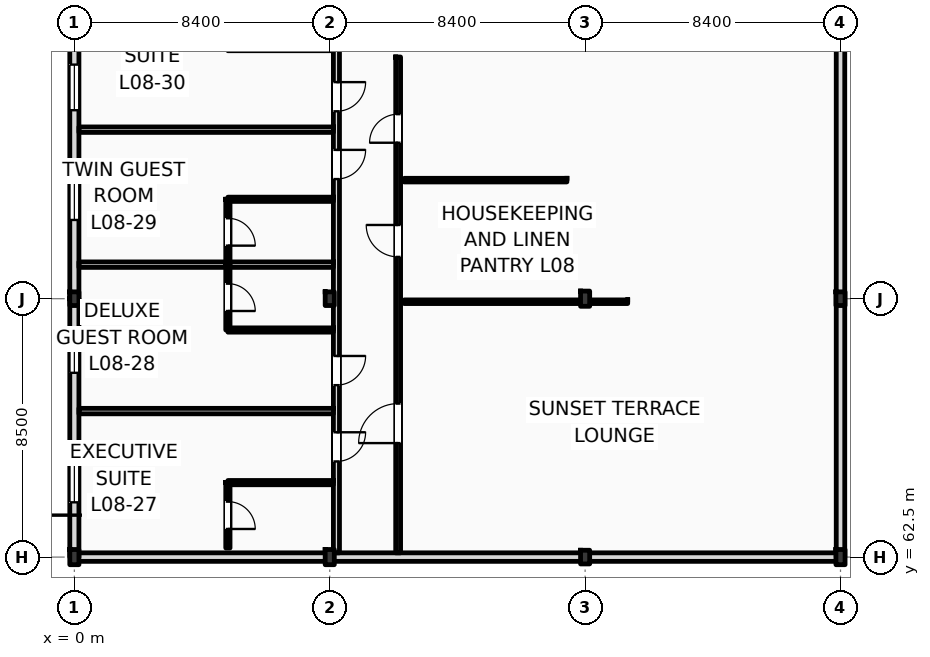
"""IFC4 building model, lengths in metres.
Left out: names, types, materials, properties, quantities, classifications, styles, units other than length and angle.
Written with IfcOpenShell. Run it as: python <this file> out.ifc"""

import sys

from ifc_helpers import new_model, si_unit, direction, frame, frame_2d, origin, origin_2d, place, context, subcontext, project, spatial, rectangle, i_section, extrude, element, fill, save


model = new_model("IFC4")
c1 = context("Model", 3, precision=1e-05, world=origin(), true_north=direction((0.0, 1.0)))
c2 = subcontext(c1, "Body", "Model", "MODEL_VIEW")
j1 = project(units=[si_unit("LENGTHUNIT", "METRE"), si_unit("PLANEANGLEUNIT", "RADIAN")], contexts=[c1])
p1 = place(None, origin())
s1 = spatial("IfcSite", under=j1, at=p1, CompositionType="ELEMENT")
p2 = place(p1, origin())
s2 = spatial("IfcBuilding", under=s1, at=p2, CompositionType="ELEMENT")
p3 = place(p2, frame((0.0, 0.0, 35.4)))
s3 = spatial("IfcBuildingStorey", under=s2, at=p3, CompositionType="ELEMENT", Elevation=35.4)
p4 = place(p3, frame((0.0, 62.5, 0.0), z_axis=(0.0, 0.0, 1.0), x_axis=(1.0, 0.0, 0.0)))
e1 = element("IfcColumn", 1, at=p4, inside=s3, PredefinedType="COLUMN", context=c2, shape_type="SweptSolid", body=[
    extrude(i_section(OverallWidth=0.3, OverallDepth=0.5, WebThickness=0.014, FlangeThickness=0.028, FilletRadius=0.027, at=origin_2d()), origin(), (0.0, 0.0, 1.0), 3.6),
])
p5 = place(p3, frame((0.0, 71.0, 0.0), z_axis=(0.0, 0.0, 1.0), x_axis=(1.0, 0.0, 0.0)))
e2 = element("IfcColumn", 2, at=p5, inside=s3, PredefinedType="COLUMN", context=c2, shape_type="SweptSolid", body=[
    extrude(i_section(OverallWidth=0.3, OverallDepth=0.45, WebThickness=0.014, FlangeThickness=0.026, FilletRadius=0.027, at=origin_2d()), origin(), (0.0, 0.0, 1.0), 3.6),
])
p6 = place(p3, frame((8.4, 62.5, 0.0), z_axis=(0.0, 0.0, 1.0), x_axis=(1.0, 0.0, 0.0)))
e3 = element("IfcColumn", 3, at=p6, inside=s3, PredefinedType="COLUMN", context=c2, shape_type="SweptSolid", body=[
    extrude(i_section(OverallWidth=0.3, OverallDepth=0.5, WebThickness=0.014, FlangeThickness=0.028, FilletRadius=0.027, at=origin_2d()), origin(), (0.0, 0.0, 1.0), 3.6),
])
for number, where, z_axis, x_axis in (
    (4, (8.4, 71.0, 0.0), (0.0, 0.0, 1.0), (1.0, 0.0, 0.0)),
    (5, (16.8, 62.5, 0.0), (0.0, 0.0, 1.0), (1.0, 0.0, 0.0)),
):
    element("IfcColumn", number, at=place(p3, frame(where, z_axis=z_axis, x_axis=x_axis)), inside=s3, PredefinedType="COLUMN", context=c2, shape_type="SweptSolid", body=[
        extrude(i_section(OverallWidth=0.3, OverallDepth=0.45, WebThickness=0.014, FlangeThickness=0.026, FilletRadius=0.027, at=origin_2d()), origin(), (0.0, 0.0, 1.0), 3.6),
    ])
for number, where, z_axis, x_axis in (
    (6, (16.8, 71.0, 0.0), (0.0, 0.0, 1.0), (1.0, 0.0, 0.0)),
    (7, (25.2, 62.5, 0.0), (0.0, 0.0, 1.0), (1.0, 0.0, 0.0)),
):
    element("IfcColumn", number, at=place(p3, frame(where, z_axis=z_axis, x_axis=x_axis)), inside=s3, PredefinedType="COLUMN", context=c2, shape_type="SweptSolid", body=[
        extrude(i_section(OverallWidth=0.3, OverallDepth=0.5, WebThickness=0.014, FlangeThickness=0.028, FilletRadius=0.027, at=origin_2d()), origin(), (0.0, 0.0, 1.0), 3.6),
    ])
p7 = place(p3, frame((25.2, 71.0, 0.0), z_axis=(0.0, 0.0, 1.0), x_axis=(1.0, 0.0, 0.0)))
e8 = element("IfcColumn", 8, at=p7, inside=s3, PredefinedType="COLUMN", context=c2, shape_type="SweptSolid", body=[
    extrude(i_section(OverallWidth=0.3, OverallDepth=0.45, WebThickness=0.014, FlangeThickness=0.026, FilletRadius=0.027, at=origin_2d()), origin(), (0.0, 0.0, 1.0), 3.6),
])
p8 = place(p3, frame((0.0, 62.5, 0.0), z_axis=(0.0, 0.0, 1.0), x_axis=(0.0, 1.0, 0.0)))
e9 = element("IfcWall", 9, at=p8, inside=s3, PredefinedType="STANDARD", context=c2, shape_type="SweptSolid", body=[
    extrude(rectangle(XDim=8.5, YDim=0.3, at=frame_2d((4.25, 0.0))), origin(), (0.0, 0.0, 1.0), 3.01),
])
p9 = place(p8, frame((1.802, 0.0, 0.9)))
e10 = element("IfcOpeningElement", 10, at=p9, cuts=e9, PredefinedType="OPENING", context=c2, shape_type="SweptSolid", body=[
    extrude(rectangle(XDim=1.5, YDim=1.93, at=frame_2d((0.75, 0.965))), frame((0.0, 0.16, 0.0), z_axis=(0.0, -1.0, 0.0), x_axis=(1.0, 0.0, 0.0)), (0.0, 0.0, 1.0), 0.32),
])
p10 = place(p8, frame((6.062, 0.0, 0.9)))
e11 = element("IfcOpeningElement", 11, at=p10, cuts=e9, PredefinedType="OPENING", context=c2, shape_type="SweptSolid", body=[
    extrude(rectangle(XDim=1.5, YDim=1.93, at=frame_2d((0.75, 0.965))), frame((0.0, 0.16, 0.0), z_axis=(0.0, -1.0, 0.0), x_axis=(1.0, 0.0, 0.0)), (0.0, 0.0, 1.0), 0.32),
])
p11 = place(p3, frame((0.0, 71.0, 0.0), z_axis=(0.0, 0.0, 1.0), x_axis=(0.0, 1.0, 0.0)))
e12 = element("IfcWall", 12, at=p11, inside=s3, PredefinedType="STANDARD", context=c2, shape_type="SweptSolid", body=[
    extrude(rectangle(XDim=8.5, YDim=0.3, at=frame_2d((4.25, 0.0))), origin(), (0.0, 0.0, 1.0), 3.01),
])
p12 = place(p11, frame((2.59, 0.0, 0.9)))
e13 = element("IfcOpeningElement", 13, at=p12, cuts=e12, PredefinedType="OPENING", context=c2, shape_type="SweptSolid", body=[
    extrude(rectangle(XDim=1.5, YDim=1.93, at=frame_2d((0.75, 0.965))), frame((0.0, 0.16, 0.0), z_axis=(0.0, -1.0, 0.0), x_axis=(1.0, 0.0, 0.0)), (0.0, 0.0, 1.0), 0.32),
])
p13 = place(p11, frame((6.2, 0.0, 0.9)))
e14 = element("IfcOpeningElement", 14, at=p13, cuts=e12, PredefinedType="OPENING", context=c2, shape_type="SweptSolid", body=[
    extrude(rectangle(XDim=1.5, YDim=1.93, at=frame_2d((0.75, 0.965))), frame((0.0, 0.16, 0.0), z_axis=(0.0, -1.0, 0.0), x_axis=(1.0, 0.0, 0.0)), (0.0, 0.0, 1.0), 0.32),
])
p14 = place(p3, frame((0.0, 62.5, 0.0), z_axis=(0.0, 0.0, 1.0), x_axis=(1.0, 0.0, 0.0)))
e15 = element("IfcWall", 15, at=p14, inside=s3, PredefinedType="STANDARD", context=c2, shape_type="SweptSolid", body=[
    extrude(rectangle(XDim=25.2, YDim=0.28, at=frame_2d((12.6, 0.0))), origin(), (0.0, 0.0, 1.0), 2.82),
])
p15 = place(p3, frame((25.2, 62.5, 0.0), z_axis=(0.0, 0.0, 1.0), x_axis=(0.0, 1.0, 0.0)))
e16 = element("IfcWall", 16, at=p15, inside=s3, PredefinedType="STANDARD", context=c2, shape_type="SweptSolid", body=[
    extrude(rectangle(XDim=17.0, YDim=0.28, at=frame_2d((8.5, 0.0))), origin(), (0.0, 0.0, 1.0), 3.01),
])
p16 = place(p3, frame((8.62, 62.64, 0.0), z_axis=(0.0, 0.0, 1.0), x_axis=(0.0, 1.0, 0.0)))
e17 = element("IfcWall", 17, at=p16, inside=s3, PredefinedType="PARTITIONING", context=c2, shape_type="SweptSolid", body=[
    extrude(rectangle(XDim=32.66, YDim=0.2, at=frame_2d((16.33, 0.0))), origin(), (0.0, 0.0, 1.0), 3.01),
])
p17 = place(p16, frame((3.006, 0.0, 0.0)))
e18 = element("IfcOpeningElement", 18, at=p17, cuts=e17, PredefinedType="OPENING", context=c2, shape_type="SweptSolid", body=[
    extrude(rectangle(XDim=0.96, YDim=2.2, at=frame_2d((0.48, 1.1))), frame((0.0, 0.11, 0.0), z_axis=(0.0, -1.0, 0.0), x_axis=(1.0, 0.0, 0.0)), (0.0, 0.0, 1.0), 0.22),
])
p18 = place(p16, frame((5.516, 0.0, 0.0)))
e19 = element("IfcOpeningElement", 19, at=p18, cuts=e17, PredefinedType="OPENING", context=c2, shape_type="SweptSolid", body=[
    extrude(rectangle(XDim=0.96, YDim=2.2, at=frame_2d((0.48, 1.1))), frame((0.0, 0.11, 0.0), z_axis=(0.0, -1.0, 0.0), x_axis=(1.0, 0.0, 0.0)), (0.0, 0.0, 1.0), 0.22),
])
p19 = place(p16, frame((12.295, 0.0, 0.0)))
e20 = element("IfcOpeningElement", 20, at=p19, cuts=e17, PredefinedType="OPENING", context=c2, shape_type="SweptSolid", body=[
    extrude(rectangle(XDim=0.96, YDim=2.2, at=frame_2d((0.48, 1.1))), frame((0.0, 0.11, 0.0), z_axis=(0.0, -1.0, 0.0), x_axis=(1.0, 0.0, 0.0)), (0.0, 0.0, 1.0), 0.22),
])
p20 = place(p16, frame((14.524, 0.0, 0.0)))
e21 = element("IfcOpeningElement", 21, at=p20, cuts=e17, PredefinedType="OPENING", context=c2, shape_type="SweptSolid", body=[
    extrude(rectangle(XDim=0.96, YDim=2.2, at=frame_2d((0.48, 1.1))), frame((0.0, 0.11, 0.0), z_axis=(0.0, -1.0, 0.0), x_axis=(1.0, 0.0, 0.0)), (0.0, 0.0, 1.0), 0.22),
])
p21 = place(p16, frame((21.552, 0.0, 0.0)))
e22 = element("IfcOpeningElement", 22, at=p21, cuts=e17, PredefinedType="OPENING", context=c2, shape_type="SweptSolid", body=[
    extrude(rectangle(XDim=0.96, YDim=2.2, at=frame_2d((0.48, 1.1))), frame((0.0, 0.11, 0.0), z_axis=(0.0, -1.0, 0.0), x_axis=(1.0, 0.0, 0.0)), (0.0, 0.0, 1.0), 0.22),
])
p22 = place(p16, frame((26.68, 0.0, 0.0)))
e23 = element("IfcOpeningElement", 23, at=p22, cuts=e17, PredefinedType="OPENING", context=c2, shape_type="SweptSolid", body=[
    extrude(rectangle(XDim=0.96, YDim=2.2, at=frame_2d((0.48, 1.1))), frame((0.0, 0.11, 0.0), z_axis=(0.0, -1.0, 0.0), x_axis=(1.0, 0.0, 0.0)), (0.0, 0.0, 1.0), 0.22),
])
p23 = place(p16, frame((30.872, 0.0, 0.0)))
e24 = element("IfcOpeningElement", 24, at=p23, cuts=e17, PredefinedType="OPENING", context=c2, shape_type="SweptSolid", body=[
    extrude(rectangle(XDim=0.96, YDim=2.2, at=frame_2d((0.48, 1.1))), frame((0.0, 0.11, 0.0), z_axis=(0.0, -1.0, 0.0), x_axis=(1.0, 0.0, 0.0)), (0.0, 0.0, 1.0), 0.22),
])
p24 = place(p3, frame((10.65, 62.64, 0.0), z_axis=(0.0, 0.0, 1.0), x_axis=(0.0, 1.0, 0.0)))
e25 = element("IfcWall", 25, at=p24, inside=s3, PredefinedType="PARTITIONING", context=c2, shape_type="SweptSolid", body=[
    extrude(rectangle(XDim=16.31, YDim=0.16, at=frame_2d((8.155, 0.0))), origin(), (0.0, 0.0, 1.0), 3.38),
])
p25 = place(p24, frame((3.61, 0.0, 0.0)))
e26 = element("IfcOpeningElement", 26, at=p25, cuts=e25, PredefinedType="OPENING", context=c2, shape_type="SweptSolid", body=[
    extrude(rectangle(XDim=1.3, YDim=2.2, at=frame_2d((0.65, 1.1))), frame((0.0, 0.09, 0.0), z_axis=(0.0, -1.0, 0.0), x_axis=(1.0, 0.0, 0.0)), (0.0, 0.0, 1.0), 0.18),
])
p26 = place(p24, frame((9.735, 0.0, 0.0)))
e27 = element("IfcOpeningElement", 27, at=p26, cuts=e25, PredefinedType="OPENING", context=c2, shape_type="SweptSolid", body=[
    extrude(rectangle(XDim=1.05, YDim=2.12, at=frame_2d((0.525, 1.06))), frame((0.0, 0.09, 0.0), z_axis=(0.0, -1.0, 0.0), x_axis=(1.0, 0.0, 0.0)), (0.0, 0.0, 1.0), 0.18),
])
p27 = place(p24, frame((13.49, 0.0, 0.0)))
e28 = element("IfcOpeningElement", 28, at=p27, cuts=e25, PredefinedType="OPENING", context=c2, shape_type="SweptSolid", body=[
    extrude(rectangle(XDim=0.94, YDim=2.15, at=frame_2d((0.47, 1.075))), frame((0.0, 0.09, 0.0), z_axis=(0.0, -1.0, 0.0), x_axis=(1.0, 0.0, 0.0)), (0.0, 0.0, 1.0), 0.18),
])
p28 = place(p3, frame((0.15, 67.303, 0.0), z_axis=(0.0, 0.0, 1.0), x_axis=(1.0, 0.0, 0.0)))
e29 = element("IfcWall", 29, at=p28, inside=s3, PredefinedType="PARTITIONING", context=c2, shape_type="SweptSolid", body=[
    extrude(rectangle(XDim=8.37, YDim=0.18, at=frame_2d((4.185, 0.0))), origin(), (0.0, 0.0, 1.0), 3.38),
])
p29 = place(p3, frame((5.05, 64.95, 0.0), z_axis=(0.0, 0.0, 1.0), x_axis=(1.0, 0.0, 0.0)))
e30 = element("IfcWall", 30, at=p29, inside=s3, PredefinedType="PARTITIONING", context=c2, shape_type="SweptSolid", body=[
    extrude(rectangle(XDim=3.47, YDim=0.14, at=frame_2d((1.735, 0.0))), origin(), (0.0, 0.0, 1.0), 3.38),
])
p30 = place(p3, frame((5.05, 62.8, 0.0), z_axis=(0.0, 0.0, 1.0), x_axis=(0.0, 1.0, 0.0)))
e31 = element("IfcWall", 31, at=p30, inside=s3, PredefinedType="PARTITIONING", context=c2, shape_type="SweptSolid", body=[
    extrude(rectangle(XDim=2.15, YDim=0.14, at=frame_2d((1.075, 0.0))), origin(), (0.0, 0.0, 1.0), 3.38),
])
p31 = place(p30, frame((0.625, 0.0, 0.0)))
e32 = element("IfcOpeningElement", 32, at=p31, cuts=e31, PredefinedType="OPENING", context=c2, shape_type="SweptSolid", body=[
    extrude(rectangle(XDim=0.9, YDim=2.1, at=frame_2d((0.45, 1.05))), frame((0.0, 0.08, 0.0), z_axis=(0.0, -1.0, 0.0), x_axis=(1.0, 0.0, 0.0)), (0.0, 0.0, 1.0), 0.16),
])
p32 = place(p3, frame((0.15, 72.12, 0.0), z_axis=(0.0, 0.0, 1.0), x_axis=(1.0, 0.0, 0.0)))
e33 = element("IfcWall", 33, at=p32, inside=s3, PredefinedType="PARTITIONING", context=c2, shape_type="SweptSolid", body=[
    extrude(rectangle(XDim=8.37, YDim=0.18, at=frame_2d((4.185, 0.0))), origin(), (0.0, 0.0, 1.0), 3.38),
])
p33 = place(p3, frame((5.05, 69.97, 0.0), z_axis=(0.0, 0.0, 1.0), x_axis=(1.0, 0.0, 0.0)))
e34 = element("IfcWall", 34, at=p33, inside=s3, PredefinedType="PARTITIONING", context=c2, shape_type="SweptSolid", body=[
    extrude(rectangle(XDim=3.47, YDim=0.14, at=frame_2d((1.735, 0.0))), origin(), (0.0, 0.0, 1.0), 3.38),
])
p34 = place(p3, frame((5.05, 69.97, 0.0), z_axis=(0.0, 0.0, 1.0), x_axis=(0.0, 1.0, 0.0)))
e35 = element("IfcWall", 35, at=p34, inside=s3, PredefinedType="PARTITIONING", context=c2, shape_type="SweptSolid", body=[
    extrude(rectangle(XDim=2.15, YDim=0.14, at=frame_2d((1.075, 0.0))), origin(), (0.0, 0.0, 1.0), 3.38),
])
p35 = place(p34, frame((0.625, 0.0, 0.0)))
e36 = element("IfcOpeningElement", 36, at=p35, cuts=e35, PredefinedType="OPENING", context=c2, shape_type="SweptSolid", body=[
    extrude(rectangle(XDim=0.9, YDim=2.1, at=frame_2d((0.45, 1.05))), frame((0.0, 0.08, 0.0), z_axis=(0.0, -1.0, 0.0), x_axis=(1.0, 0.0, 0.0)), (0.0, 0.0, 1.0), 0.16),
])
p36 = place(p3, frame((0.15, 76.56, 0.0), z_axis=(0.0, 0.0, 1.0), x_axis=(1.0, 0.0, 0.0)))
e37 = element("IfcWall", 37, at=p36, inside=s3, PredefinedType="PARTITIONING", context=c2, shape_type="SweptSolid", body=[
    extrude(rectangle(XDim=8.37, YDim=0.18, at=frame_2d((4.185, 0.0))), origin(), (0.0, 0.0, 1.0), 3.38),
])
p37 = place(p3, frame((5.05, 74.27, 0.0), z_axis=(0.0, 0.0, 1.0), x_axis=(1.0, 0.0, 0.0)))
e38 = element("IfcWall", 38, at=p37, inside=s3, PredefinedType="PARTITIONING", context=c2, shape_type="SweptSolid", body=[
    extrude(rectangle(XDim=3.47, YDim=0.14, at=frame_2d((1.735, 0.0))), origin(), (0.0, 0.0, 1.0), 3.38),
])
p38 = place(p3, frame((5.05, 72.12, 0.0), z_axis=(0.0, 0.0, 1.0), x_axis=(0.0, 1.0, 0.0)))
e39 = element("IfcWall", 39, at=p38, inside=s3, PredefinedType="PARTITIONING", context=c2, shape_type="SweptSolid", body=[
    extrude(rectangle(XDim=2.15, YDim=0.14, at=frame_2d((1.075, 0.0))), origin(), (0.0, 0.0, 1.0), 3.38),
])
p39 = place(p38, frame((0.625, 0.0, 0.0)))
e40 = element("IfcOpeningElement", 40, at=p39, cuts=e39, PredefinedType="OPENING", context=c2, shape_type="SweptSolid", body=[
    extrude(rectangle(XDim=0.9, YDim=2.1, at=frame_2d((0.45, 1.05))), frame((0.0, 0.08, 0.0), z_axis=(0.0, -1.0, 0.0), x_axis=(1.0, 0.0, 0.0)), (0.0, 0.0, 1.0), 0.16),
])
p40 = place(p3, frame((10.85, 70.9, 0.0), z_axis=(0.0, 0.0, 1.0), x_axis=(1.0, 0.0, 0.0)))
e41 = element("IfcWall", 41, at=p40, inside=s3, PredefinedType="PARTITIONING", context=c2, shape_type="SweptSolid", body=[
    extrude(rectangle(XDim=7.35, YDim=0.12, at=frame_2d((3.675, 0.0))), origin(), (0.0, 0.0, 1.0), 2.82),
])
p41 = place(p3, frame((10.85, 74.9, 0.0), z_axis=(0.0, 0.0, 1.0), x_axis=(1.0, 0.0, 0.0)))
e42 = element("IfcWall", 42, at=p41, inside=s3, PredefinedType="PARTITIONING", context=c2, shape_type="SweptSolid", body=[
    extrude(rectangle(XDim=5.35, YDim=0.12, at=frame_2d((2.675, 0.0))), origin(), (0.0, 0.0, 1.0), 3.38),
])
p42 = place(p9, origin())
e43 = element("IfcWindow", 43, at=p42, inside=s3, PartitioningType="DOUBLE_PANEL_VERTICAL", PredefinedType="WINDOW", context=c2, shape_type="SweptSolid", body=[
    extrude(rectangle(XDim=1.5, YDim=1.93, at=frame_2d((0.75, 0.965))), frame((0.0, 0.03, 0.0), z_axis=(0.0, -1.0, 0.0), x_axis=(1.0, 0.0, 0.0)), (0.0, 0.0, 1.0), 0.06),
])
fill(e10, e43)
p43 = place(p10, origin())
e44 = element("IfcWindow", 44, at=p43, inside=s3, PartitioningType="DOUBLE_PANEL_VERTICAL", PredefinedType="WINDOW", context=c2, shape_type="SweptSolid", body=[
    extrude(rectangle(XDim=1.5, YDim=1.93, at=frame_2d((0.75, 0.965))), frame((0.0, 0.03, 0.0), z_axis=(0.0, -1.0, 0.0), x_axis=(1.0, 0.0, 0.0)), (0.0, 0.0, 1.0), 0.06),
])
fill(e11, e44)
p44 = place(p12, origin())
e45 = element("IfcWindow", 45, at=p44, inside=s3, PartitioningType="DOUBLE_PANEL_VERTICAL", PredefinedType="WINDOW", context=c2, shape_type="SweptSolid", body=[
    extrude(rectangle(XDim=1.5, YDim=1.93, at=frame_2d((0.75, 0.965))), frame((0.0, 0.03, 0.0), z_axis=(0.0, -1.0, 0.0), x_axis=(1.0, 0.0, 0.0)), (0.0, 0.0, 1.0), 0.06),
])
fill(e13, e45)
p45 = place(p13, origin())
e46 = element("IfcWindow", 46, at=p45, inside=s3, PartitioningType="DOUBLE_PANEL_VERTICAL", PredefinedType="WINDOW", context=c2, shape_type="SweptSolid", body=[
    extrude(rectangle(XDim=1.5, YDim=1.93, at=frame_2d((0.75, 0.965))), frame((0.0, 0.03, 0.0), z_axis=(0.0, -1.0, 0.0), x_axis=(1.0, 0.0, 0.0)), (0.0, 0.0, 1.0), 0.06),
])
fill(e14, e46)
p46 = place(p17, frame((0.96, 0.0, 0.0), z_axis=(0.0, 0.0, 1.0), x_axis=(-1.0, 0.0, 0.0)))
e47 = element("IfcDoor", 47, at=p46, inside=s3, OperationType="SINGLE_SWING_RIGHT", PredefinedType="DOOR", context=c2, shape_type="SweptSolid", body=[
    extrude(rectangle(XDim=0.96, YDim=2.2, at=frame_2d((0.48, 1.1))), frame((0.0, 0.025, 0.0), z_axis=(0.0, -1.0, 0.0), x_axis=(1.0, 0.0, 0.0)), (0.0, 0.0, 1.0), 0.05),
])
fill(e18, e47)
p47 = place(p31, frame((0.9, 0.0, 0.0), z_axis=(0.0, 0.0, 1.0), x_axis=(-1.0, 0.0, 0.0)))
e48 = element("IfcDoor", 48, at=p47, inside=s3, OperationType="SINGLE_SWING_LEFT", PredefinedType="DOOR", context=c2, shape_type="SweptSolid", body=[
    extrude(rectangle(XDim=0.9, YDim=2.1, at=frame_2d((0.45, 1.05))), frame((0.0, 0.025, 0.0), z_axis=(0.0, -1.0, 0.0), x_axis=(1.0, 0.0, 0.0)), (0.0, 0.0, 1.0), 0.05),
])
fill(e32, e48)
p48 = place(p18, frame((0.96, 0.0, 0.0), z_axis=(0.0, 0.0, 1.0), x_axis=(-1.0, 0.0, 0.0)))
e49 = element("IfcDoor", 49, at=p48, inside=s3, OperationType="SINGLE_SWING_RIGHT", PredefinedType="DOOR", context=c2, shape_type="SweptSolid", body=[
    extrude(rectangle(XDim=0.96, YDim=2.2, at=frame_2d((0.48, 1.1))), frame((0.0, 0.025, 0.0), z_axis=(0.0, -1.0, 0.0), x_axis=(1.0, 0.0, 0.0)), (0.0, 0.0, 1.0), 0.05),
])
fill(e19, e49)
p49 = place(p35, frame((0.9, 0.0, 0.0), z_axis=(0.0, 0.0, 1.0), x_axis=(-1.0, 0.0, 0.0)))
e50 = element("IfcDoor", 50, at=p49, inside=s3, OperationType="SINGLE_SWING_LEFT", PredefinedType="DOOR", context=c2, shape_type="SweptSolid", body=[
    extrude(rectangle(XDim=0.9, YDim=2.1, at=frame_2d((0.45, 1.05))), frame((0.0, 0.025, 0.0), z_axis=(0.0, -1.0, 0.0), x_axis=(1.0, 0.0, 0.0)), (0.0, 0.0, 1.0), 0.05),
])
fill(e36, e50)
p50 = place(p19, frame((0.96, 0.0, 0.0), z_axis=(0.0, 0.0, 1.0), x_axis=(-1.0, 0.0, 0.0)))
e51 = element("IfcDoor", 51, at=p50, inside=s3, OperationType="SINGLE_SWING_RIGHT", PredefinedType="DOOR", context=c2, shape_type="SweptSolid", body=[
    extrude(rectangle(XDim=0.96, YDim=2.2, at=frame_2d((0.48, 1.1))), frame((0.0, 0.025, 0.0), z_axis=(0.0, -1.0, 0.0), x_axis=(1.0, 0.0, 0.0)), (0.0, 0.0, 1.0), 0.05),
])
fill(e20, e51)
p51 = place(p39, frame((0.9, 0.0, 0.0), z_axis=(0.0, 0.0, 1.0), x_axis=(-1.0, 0.0, 0.0)))
e52 = element("IfcDoor", 52, at=p51, inside=s3, OperationType="SINGLE_SWING_LEFT", PredefinedType="DOOR", context=c2, shape_type="SweptSolid", body=[
    extrude(rectangle(XDim=0.9, YDim=2.1, at=frame_2d((0.45, 1.05))), frame((0.0, 0.025, 0.0), z_axis=(0.0, -1.0, 0.0), x_axis=(1.0, 0.0, 0.0)), (0.0, 0.0, 1.0), 0.05),
])
fill(e40, e52)
p52 = place(p20, frame((0.96, 0.0, 0.0), z_axis=(0.0, 0.0, 1.0), x_axis=(-1.0, 0.0, 0.0)))
e53 = element("IfcDoor", 53, at=p52, inside=s3, OperationType="SINGLE_SWING_RIGHT", PredefinedType="DOOR", context=c2, shape_type="SweptSolid", body=[
    extrude(rectangle(XDim=0.96, YDim=2.2, at=frame_2d((0.48, 1.1))), frame((0.0, 0.025, 0.0), z_axis=(0.0, -1.0, 0.0), x_axis=(1.0, 0.0, 0.0)), (0.0, 0.0, 1.0), 0.05),
])
fill(e21, e53)
p53 = place(p25, origin())
e54 = element("IfcDoor", 54, at=p53, inside=s3, OperationType="SINGLE_SWING_LEFT", PredefinedType="DOOR", context=c2, shape_type="SweptSolid", body=[
    extrude(rectangle(XDim=1.3, YDim=2.2, at=frame_2d((0.65, 1.1))), frame((0.0, 0.025, 0.0), z_axis=(0.0, -1.0, 0.0), x_axis=(1.0, 0.0, 0.0)), (0.0, 0.0, 1.0), 0.05),
])
fill(e26, e54)
p54 = place(p26, origin())
e55 = element("IfcDoor", 55, at=p54, inside=s3, OperationType="SINGLE_SWING_RIGHT", PredefinedType="DOOR", context=c2, shape_type="SweptSolid", body=[
    extrude(rectangle(XDim=1.05, YDim=2.12, at=frame_2d((0.525, 1.06))), frame((0.0, 0.025, 0.0), z_axis=(0.0, -1.0, 0.0), x_axis=(1.0, 0.0, 0.0)), (0.0, 0.0, 1.0), 0.05),
])
fill(e27, e55)
p55 = place(p27, origin())
e56 = element("IfcDoor", 56, at=p55, inside=s3, OperationType="SINGLE_SWING_LEFT", PredefinedType="DOOR", context=c2, shape_type="SweptSolid", body=[
    extrude(rectangle(XDim=0.94, YDim=2.15, at=frame_2d((0.47, 1.075))), frame((0.0, 0.025, 0.0), z_axis=(0.0, -1.0, 0.0), x_axis=(1.0, 0.0, 0.0)), (0.0, 0.0, 1.0), 0.05),
])
fill(e28, e56)
save(model, sys.argv[1])
